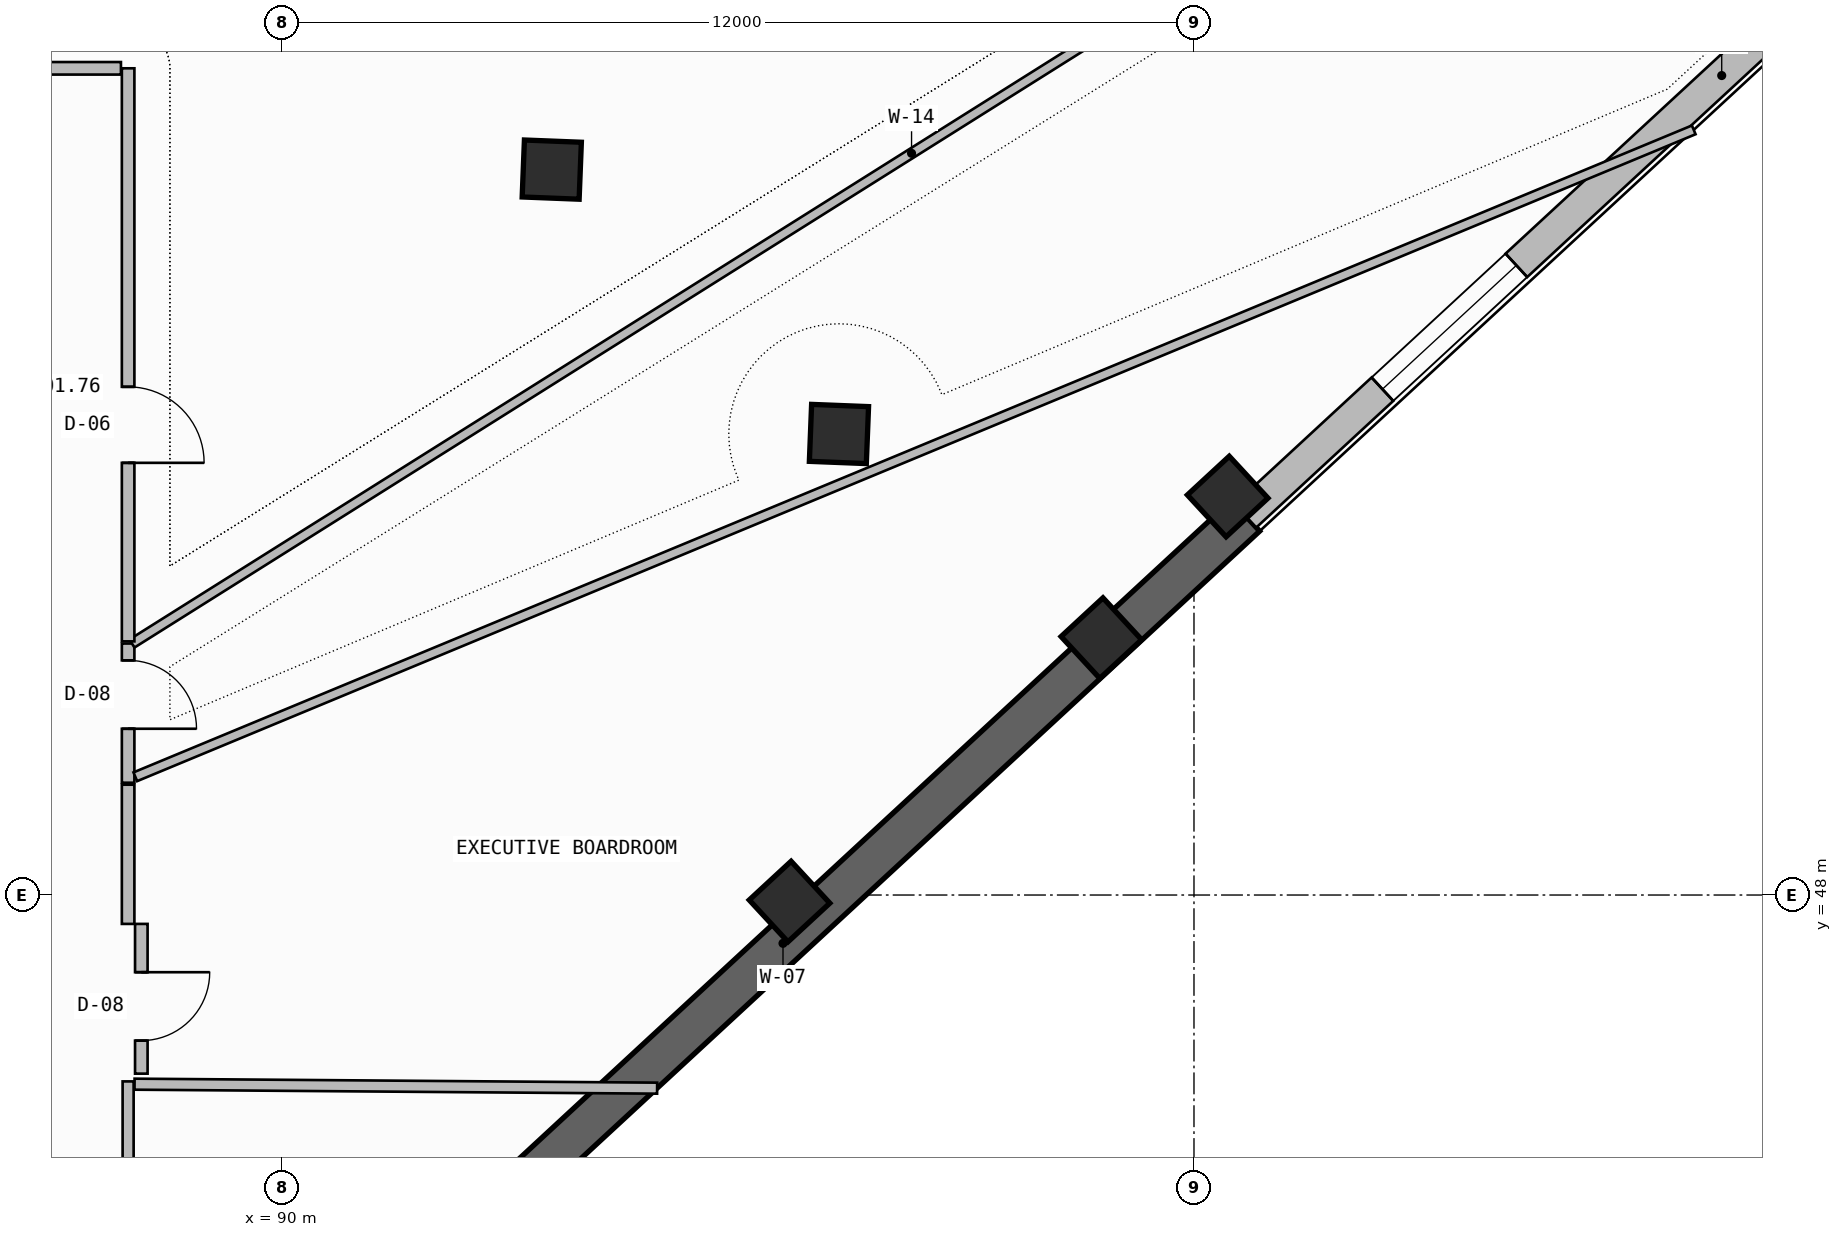
"""IFC4 building model, lengths in metres.
Left out: names, types, materials, properties, quantities, classifications, styles, units other than length and angle.
Written with IfcOpenShell. Run it as: python <this file> out.ifc"""

import sys

from ifc_helpers import new_model, si_unit, direction, frame, frame_2d, origin, origin_2d, place, context, subcontext, project, spatial, rectangle, extrude, element, fill, save


model = new_model("IFC4")
c1 = context("Model", 3, precision=1e-05, world=origin(), true_north=direction((0.0, 1.0)))
c2 = subcontext(c1, "Body", "Model", "MODEL_VIEW")
j1 = project(units=[si_unit("LENGTHUNIT", "METRE"), si_unit("PLANEANGLEUNIT", "RADIAN")], contexts=[c1])
p1 = place(None, origin())
s1 = spatial("IfcSite", under=j1, at=p1, CompositionType="ELEMENT")
p2 = place(p1, origin())
s2 = spatial("IfcBuilding", under=s1, at=p2, CompositionType="ELEMENT")
p3 = place(p2, frame((0.0, 0.0, 271.3)))
s3 = spatial("IfcBuildingStorey", under=s2, at=p3, CompositionType="ELEMENT", Elevation=271.3)
for number, where, z_axis, x_axis in (
    (1, (96.679, 47.914, 0.0), (0.0, 0.0, 1.0), (0.734, 0.679, 0.0)),
    (2, (102.443, 53.242, 0.0), (0.0, 0.0, 1.0), (0.734, 0.679, 0.0)),
    (3, (100.782, 51.38, 0.0), (0.0, 0.0, 1.0), (0.734, 0.679, 0.0)),
    (4, (97.329, 54.065, 0.0), (0.0, 0.0, 1.0), (0.039, 0.999, 0.0)),
    (5, (93.55, 57.544, 0.0), (0.0, 0.0, 1.0), (0.039, 0.999, 0.0)),
):
    element("IfcColumn", number, at=place(p3, frame(where, z_axis=z_axis, x_axis=x_axis)), inside=s3, PredefinedType="COLUMN", context=c2, shape_type="SweptSolid", body=[
        extrude(rectangle(XDim=0.75, YDim=0.75, at=origin_2d()), origin(), (0.0, 0.0, 1.0), 3.52),
    ])
p4 = place(p3, frame((90.508, 41.74, -0.26), z_axis=(0.0, 0.0, 1.0), x_axis=(0.734315848115, 0.678807951638, 0.0)))
e6 = element("IfcWall", 6, at=p4, inside=s3, PredefinedType="SHEAR", context=c2, shape_type="SweptSolid", body=[
    extrude(rectangle(XDim=16.573, YDim=0.55, at=frame_2d((8.286, 0.0))), origin(), (0.0, 0.0, 1.0), 3.52),
])
p5 = place(p3, frame((102.677, 52.989, 0.0), z_axis=(0.0, 0.0, 1.0), x_axis=(0.734331107219, 0.678791444386, 0.0)))
e7 = element("IfcWall", 7, at=p5, inside=s3, PredefinedType="SOLIDWALL", context=c2, shape_type="SweptSolid", body=[
    extrude(rectangle(XDim=12.211, YDim=0.42, at=frame_2d((6.106, 0.0))), origin(), (0.0, 0.0, 1.0), 2.245),
])
p6 = place(p5, frame((2.454, 0.0, 0.965)))
e8 = element("IfcOpeningElement", 8, at=p6, cuts=e7, PredefinedType="OPENING", context=c2, shape_type="SweptSolid", body=[
    extrude(rectangle(XDim=2.4, YDim=1.2, at=frame_2d((1.2, 0.6))), frame((0.0, 0.22, 0.0), z_axis=(0.0, -1.0, 0.0), x_axis=(1.0, 0.0, 0.0)), (0.0, 0.0, 1.0), 0.44),
])
p7 = place(p3, frame((87.976, 42.35, 0.0), z_axis=(0.0, 0.0, 1.0), x_axis=(0.0, 1.0, 0.0)))
e9 = element("IfcWall", 9, at=p7, inside=s3, PredefinedType="PARTITIONING", context=c2, shape_type="SweptSolid", body=[
    extrude(rectangle(XDim=3.198, YDim=0.145, at=frame_2d((1.599, 0.0))), origin(), (0.0, 0.0, 1.0), 2.745),
])
p8 = place(p7, frame((1.124, 0.0, 0.0)))
e10 = element("IfcOpeningElement", 10, at=p8, cuts=e9, PredefinedType="OPENING", context=c2, shape_type="SweptSolid", body=[
    extrude(rectangle(XDim=0.95, YDim=2.15, at=frame_2d((0.475, 1.075))), frame((0.0, 0.083, 0.0), z_axis=(0.0, -1.0, 0.0), x_axis=(1.0, 0.0, 0.0)), (0.0, 0.0, 1.0), 0.165),
])
p9 = place(p3, frame((88.061, 45.511, 0.0), z_axis=(0.0, 0.0, 1.0), x_axis=(0.999970861304, -0.007633907438, 0.0)))
e11 = element("IfcWall", 11, at=p9, inside=s3, PredefinedType="PARTITIONING", context=c2, shape_type="SweptSolid", body=[
    extrude(rectangle(XDim=6.876, YDim=0.145, at=frame_2d((3.438, 0.0))), origin(), (0.0, 0.0, 1.0), 2.245),
])
p10 = place(p3, frame((87.976, 49.477, 0.0), z_axis=(0.0, 0.0, 1.0), x_axis=(0.0, 1.0, 0.0)))
e12 = element("IfcWall", 12, at=p10, inside=s3, PredefinedType="PARTITIONING", context=c2, shape_type="SweptSolid", body=[
    extrude(rectangle(XDim=1.832, YDim=0.165, at=frame_2d((0.916, 0.0))), origin(), (0.0, 0.0, 1.0), 3.26),
])
p11 = place(p10, frame((0.71, 0.0, 0.0)))
e13 = element("IfcOpeningElement", 13, at=p11, cuts=e12, PredefinedType="OPENING", context=c2, shape_type="SweptSolid", body=[
    extrude(rectangle(XDim=0.9, YDim=2.1, at=frame_2d((0.45, 1.05))), frame((0.0, 0.093, 0.0), z_axis=(0.0, -1.0, 0.0), x_axis=(1.0, 0.0, 0.0)), (0.0, 0.0, 1.0), 0.185),
])
p12 = place(p3, frame((108.575, 58.067, 0.0), z_axis=(0.0, 0.0, 1.0), x_axis=(-0.923597614344, -0.383363335203, 0.0)))
e14 = element("IfcWall", 14, at=p12, inside=s3, PredefinedType="PARTITIONING", context=c2, shape_type="SweptSolid", body=[
    extrude(rectangle(XDim=22.201, YDim=0.125, at=frame_2d((11.101, 0.0))), origin(), (0.0, 0.0, 1.0), 2.645),
])
p13 = place(p3, frame((88.027, 51.309, 0.0), z_axis=(0.0, 0.0, 1.0), x_axis=(0.846577402355, 0.532265630885, 0.0)))
e15 = element("IfcWall", 15, at=p13, inside=s3, PredefinedType="PARTITIONING", context=c2, shape_type="SweptSolid", body=[
    extrude(rectangle(XDim=24.232, YDim=0.125, at=frame_2d((12.116, 0.0))), origin(), (0.0, 0.0, 1.0), 2.645),
])
p14 = place(p3, frame((88.15, 45.65, 0.0), z_axis=(0.0, 0.0, 1.0), x_axis=(0.0, 1.0, 0.0)))
e16 = element("IfcWall", 16, at=p14, inside=s3, PredefinedType="PARTITIONING", context=c2, shape_type="SweptSolid", body=[
    extrude(rectangle(XDim=1.97, YDim=0.165, at=frame_2d((0.985, 0.0))), origin(), (0.0, 0.0, 1.0), 3.26),
])
p15 = place(p14, frame((0.435, 0.0, 0.0)))
e17 = element("IfcOpeningElement", 17, at=p15, cuts=e16, PredefinedType="OPENING", context=c2, shape_type="SweptSolid", body=[
    extrude(rectangle(XDim=0.9, YDim=2.1, at=frame_2d((0.45, 1.05))), frame((0.0, 0.093, 0.0), z_axis=(0.0, -1.0, 0.0), x_axis=(1.0, 0.0, 0.0)), (0.0, 0.0, 1.0), 0.185),
])
p16 = place(p3, frame((87.976, 47.62, 0.0), z_axis=(0.0, 0.0, 1.0), x_axis=(0.0, 1.0, 0.0)))
e18 = element("IfcWall", 18, at=p16, inside=s3, PredefinedType="PARTITIONING", context=c2, shape_type="SweptSolid", body=[
    extrude(rectangle(XDim=1.831, YDim=0.165, at=frame_2d((0.916, 0.0))), origin(), (0.0, 0.0, 1.0), 3.26),
])
p17 = place(p3, frame((87.976, 51.337, 0.0), z_axis=(0.0, 0.0, 1.0), x_axis=(0.0, 1.0, 0.0)))
e19 = element("IfcWall", 19, at=p17, inside=s3, PredefinedType="PARTITIONING", context=c2, shape_type="SweptSolid", body=[
    extrude(rectangle(XDim=7.539, YDim=0.165, at=frame_2d((3.77, 0.0))), origin(), (0.0, 0.0, 1.0), 2.745),
])
p18 = place(p17, frame((2.349, 0.0, 0.0)))
e20 = element("IfcOpeningElement", 20, at=p18, cuts=e19, PredefinedType="OPENING", context=c2, shape_type="SweptSolid", body=[
    extrude(rectangle(XDim=1.0, YDim=2.2, at=frame_2d((0.5, 1.1))), frame((0.0, 0.093, 0.0), z_axis=(0.0, -1.0, 0.0), x_axis=(1.0, 0.0, 0.0)), (0.0, 0.0, 1.0), 0.185),
])
p19 = place(p3, frame((87.882, 58.876, 0.0), z_axis=(0.0, 0.0, 1.0), x_axis=(-1.0, 0.0, 0.0)))
e21 = element("IfcWall", 21, at=p19, inside=s3, PredefinedType="PARTITIONING", context=c2, shape_type="SweptSolid", body=[
    extrude(rectangle(XDim=2.636, YDim=0.165, at=frame_2d((1.318, 0.0))), origin(), (0.0, 0.0, 1.0), 2.745),
])
p20 = place(p3, frame((85.331, 58.971, 0.0), z_axis=(0.0, 0.0, 1.0), x_axis=(0.429074283855, 0.903269206236, 0.0)))
e22 = element("IfcWall", 22, at=p20, inside=s3, PredefinedType="PARTITIONING", context=c2, shape_type="SweptSolid", body=[
    extrude(rectangle(XDim=5.416, YDim=0.125, at=frame_2d((2.708, 0.0))), origin(), (0.0, 0.0, 1.0), 3.26),
])
p21 = place(p6, origin())
e23 = element("IfcWindow", 23, at=p21, inside=s3, PartitioningType="SINGLE_PANEL", PredefinedType="WINDOW", context=c2, shape_type="SweptSolid", body=[
    extrude(rectangle(XDim=2.4, YDim=1.2, at=frame_2d((1.2, 0.6))), frame((0.0, 0.03, 0.0), z_axis=(0.0, -1.0, 0.0), x_axis=(1.0, 0.0, 0.0)), (0.0, 0.0, 1.0), 0.06),
])
fill(e8, e23)
p22 = place(p11, frame((0.9, 0.0, 0.0), z_axis=(0.0, 0.0, 1.0), x_axis=(-1.0, 0.0, 0.0)))
e24 = element("IfcDoor", 24, at=p22, inside=s3, OperationType="SINGLE_SWING_RIGHT", PredefinedType="DOOR", context=c2, shape_type="SweptSolid", body=[
    extrude(rectangle(XDim=0.9, YDim=2.1, at=frame_2d((0.45, 1.05))), frame((0.0, 0.025, 0.0), z_axis=(0.0, -1.0, 0.0), x_axis=(1.0, 0.0, 0.0)), (0.0, 0.0, 1.0), 0.05),
])
fill(e13, e24)
p23 = place(p15, frame((0.9, 0.0, 0.0), z_axis=(0.0, 0.0, 1.0), x_axis=(-1.0, 0.0, 0.0)))
e25 = element("IfcDoor", 25, at=p23, inside=s3, OperationType="SINGLE_SWING_LEFT", PredefinedType="DOOR", context=c2, shape_type="SweptSolid", body=[
    extrude(rectangle(XDim=0.9, YDim=2.1, at=frame_2d((0.45, 1.05))), frame((0.0, 0.025, 0.0), z_axis=(0.0, -1.0, 0.0), x_axis=(1.0, 0.0, 0.0)), (0.0, 0.0, 1.0), 0.05),
])
fill(e17, e25)
p24 = place(p18, frame((1.0, 0.0, 0.0), z_axis=(0.0, 0.0, 1.0), x_axis=(-1.0, 0.0, 0.0)))
e26 = element("IfcDoor", 26, at=p24, inside=s3, OperationType="SINGLE_SWING_RIGHT", PredefinedType="DOOR", context=c2, shape_type="SweptSolid", body=[
    extrude(rectangle(XDim=1.0, YDim=2.2, at=frame_2d((0.5, 1.1))), frame((0.0, 0.025, 0.0), z_axis=(0.0, -1.0, 0.0), x_axis=(1.0, 0.0, 0.0)), (0.0, 0.0, 1.0), 0.05),
])
fill(e20, e26)
save(model, sys.argv[1])
